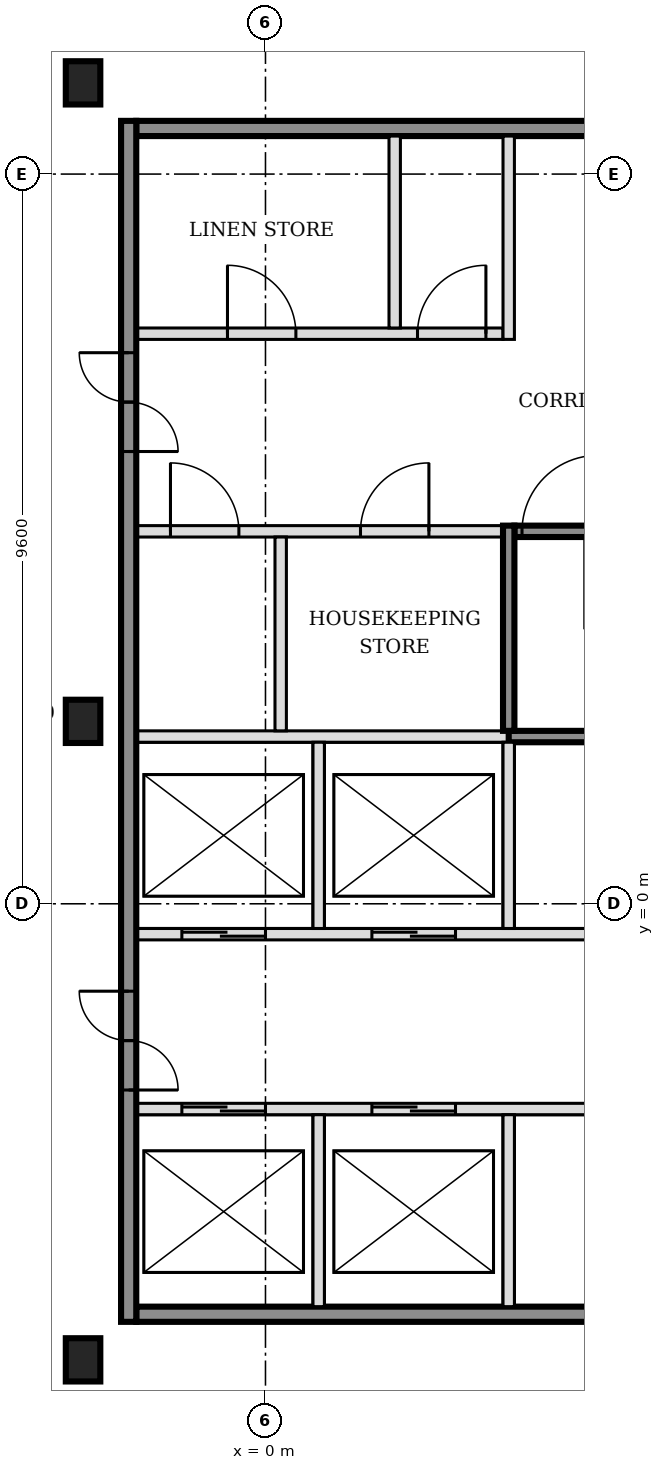
"""IFC4 building model, lengths in metres.
Left out: names, types, materials, properties, quantities, classifications, styles, units other than length and angle.
Written with IfcOpenShell. Run it as: python <this file> out.ifc"""

import sys

from ifc_helpers import new_model, si_unit, direction, frame, frame_2d, origin, origin_2d, place, context, subcontext, project, spatial, rectangle, i_section, extrude, element, fill, save


model = new_model("IFC4")
c1 = context("Model", 3, precision=1e-05, world=origin(), true_north=direction((0.0, 1.0)))
c2 = subcontext(c1, "Body", "Model", "MODEL_VIEW")
j1 = project(units=[si_unit("LENGTHUNIT", "METRE"), si_unit("PLANEANGLEUNIT", "RADIAN")], contexts=[c1])
p1 = place(None, origin())
s1 = spatial("IfcSite", under=j1, at=p1, CompositionType="ELEMENT")
p2 = place(p1, origin())
s2 = spatial("IfcBuilding", under=s1, at=p2, CompositionType="ELEMENT")
p3 = place(p2, frame((0.0, 0.0, 54.6)))
s3 = spatial("IfcBuildingStorey", under=s2, at=p3, CompositionType="ELEMENT", Elevation=54.6)
for number, where, z_axis, x_axis in (
    (1, (-2.4, -6.0, -0.15), (0.0, 0.0, 1.0), (1.0, 0.0, 0.0)),
    (2, (-2.4, 2.4, -0.15), (0.0, 0.0, 1.0), (1.0, 0.0, 0.0)),
    (3, (-2.4, 10.8, -0.15), (0.0, 0.0, 1.0), (1.0, 0.0, 0.0)),
):
    element("IfcColumn", number, at=place(p3, frame(where, z_axis=z_axis, x_axis=x_axis)), inside=s3, PredefinedType="COLUMN", context=c2, shape_type="SweptSolid", body=[
        extrude(i_section(OverallWidth=0.454, OverallDepth=0.569, WebThickness=0.078, FlangeThickness=0.125, FilletRadius=0.015, at=origin_2d()), origin(), (0.0, 0.0, 1.0), 3.6),
    ])
p4 = place(p3, frame((-1.7, -5.4, 0.0), z_axis=(0.0, 0.0, 1.0), x_axis=(1.0, 0.0, 0.0)))
e4 = element("IfcWall", 4, at=p4, inside=s3, PredefinedType="SOLIDWALL", context=c2, shape_type="SweptSolid", body=[
    extrude(rectangle(XDim=7.9, YDim=0.2, at=frame_2d((3.95, 0.0))), origin(), (0.0, 0.0, 1.0), 3.45),
])
p5 = place(p3, frame((-1.7, -2.7, 0.0), z_axis=(0.0, 0.0, 1.0), x_axis=(1.0, 0.0, 0.0)))
e5 = element("IfcWall", 5, at=p5, inside=s3, PredefinedType="SOLIDWALL", context=c2, shape_type="SweptSolid", body=[
    extrude(rectangle(XDim=7.9, YDim=0.15, at=frame_2d((3.95, 0.0))), origin(), (0.0, 0.0, 1.0), 3.45),
])
p6 = place(p5, frame((0.6, 0.0, 0.0)))
e6 = element("IfcOpeningElement", 6, at=p6, cuts=e5, PredefinedType="OPENING", context=c2, shape_type="SweptSolid", body=[
    extrude(rectangle(XDim=1.1, YDim=2.1, at=frame_2d((0.55, 1.05))), frame((0.0, 0.085, 0.0), z_axis=(0.0, -1.0, 0.0), x_axis=(1.0, 0.0, 0.0)), (0.0, 0.0, 1.0), 0.17),
])
p7 = place(p5, frame((3.1, 0.0, 0.0)))
e7 = element("IfcOpeningElement", 7, at=p7, cuts=e5, PredefinedType="OPENING", context=c2, shape_type="SweptSolid", body=[
    extrude(rectangle(XDim=1.1, YDim=2.1, at=frame_2d((0.55, 1.05))), frame((0.0, 0.085, 0.0), z_axis=(0.0, -1.0, 0.0), x_axis=(1.0, 0.0, 0.0)), (0.0, 0.0, 1.0), 0.17),
])
p8 = place(p3, frame((-1.7, -0.4, 0.0), z_axis=(0.0, 0.0, 1.0), x_axis=(1.0, 0.0, 0.0)))
e8 = element("IfcWall", 8, at=p8, inside=s3, PredefinedType="SOLIDWALL", context=c2, shape_type="SweptSolid", body=[
    extrude(rectangle(XDim=15.925, YDim=0.15, at=frame_2d((7.962, 0.0))), origin(), (0.0, 0.0, 1.0), 3.45),
])
p9 = place(p8, frame((0.6, 0.0, 0.0)))
e9 = element("IfcOpeningElement", 9, at=p9, cuts=e8, PredefinedType="OPENING", context=c2, shape_type="SweptSolid", body=[
    extrude(rectangle(XDim=1.1, YDim=2.1, at=frame_2d((0.55, 1.05))), frame((0.0, 0.085, 0.0), z_axis=(0.0, -1.0, 0.0), x_axis=(1.0, 0.0, 0.0)), (0.0, 0.0, 1.0), 0.17),
])
p10 = place(p8, frame((3.1, 0.0, 0.0)))
e10 = element("IfcOpeningElement", 10, at=p10, cuts=e8, PredefinedType="OPENING", context=c2, shape_type="SweptSolid", body=[
    extrude(rectangle(XDim=1.1, YDim=2.1, at=frame_2d((0.55, 1.05))), frame((0.0, 0.085, 0.0), z_axis=(0.0, -1.0, 0.0), x_axis=(1.0, 0.0, 0.0)), (0.0, 0.0, 1.0), 0.17),
])
p11 = place(p8, frame((11.575, 0.0, 0.0)))
e11 = element("IfcOpeningElement", 11, at=p11, cuts=e8, PredefinedType="OPENING", context=c2, shape_type="SweptSolid", body=[
    extrude(rectangle(XDim=1.2, YDim=2.1, at=frame_2d((0.6, 1.05))), frame((0.0, 0.085, 0.0), z_axis=(0.0, -1.0, 0.0), x_axis=(1.0, 0.0, 0.0)), (0.0, 0.0, 1.0), 0.17),
])
p12 = place(p8, frame((14.125, 0.0, 0.0)))
e12 = element("IfcOpeningElement", 12, at=p12, cuts=e8, PredefinedType="OPENING", context=c2, shape_type="SweptSolid", body=[
    extrude(rectangle(XDim=1.2, YDim=2.1, at=frame_2d((0.6, 1.05))), frame((0.0, 0.085, 0.0), z_axis=(0.0, -1.0, 0.0), x_axis=(1.0, 0.0, 0.0)), (0.0, 0.0, 1.0), 0.17),
])
p13 = place(p3, frame((-1.7, 2.2, 0.0), z_axis=(0.0, 0.0, 1.0), x_axis=(1.0, 0.0, 0.0)))
e13 = element("IfcWall", 13, at=p13, inside=s3, PredefinedType="SOLIDWALL", context=c2, shape_type="SweptSolid", body=[
    extrude(rectangle(XDim=4.9, YDim=0.15, at=frame_2d((2.45, 0.0))), origin(), (0.0, 0.0, 1.0), 3.45),
])
p14 = place(p3, frame((3.2, 2.2, 0.0), z_axis=(0.0, 0.0, 1.0), x_axis=(1.0, 0.0, 0.0)))
e14 = element("IfcWall", 14, at=p14, inside=s3, PredefinedType="SOLIDWALL", context=c2, shape_type="SweptSolid", body=[
    extrude(rectangle(XDim=6.5, YDim=0.15, at=frame_2d((3.25, 0.0))), origin(), (0.0, 0.0, 1.0), 3.45),
])
p15 = place(p3, frame((-1.7, 4.9, 0.0), z_axis=(0.0, 0.0, 1.0), x_axis=(1.0, 0.0, 0.0)))
e15 = element("IfcWall", 15, at=p15, inside=s3, PredefinedType="PARTITIONING", context=c2, shape_type="SweptSolid", body=[
    extrude(rectangle(XDim=4.825, YDim=0.15, at=frame_2d((2.413, 0.0))), origin(), (0.0, 0.0, 1.0), 3.45),
])
p16 = place(p15, frame((0.45, 0.0, 0.0)))
e16 = element("IfcOpeningElement", 16, at=p16, cuts=e15, PredefinedType="OPENING", context=c2, shape_type="SweptSolid", body=[
    extrude(rectangle(XDim=0.9, YDim=2.1, at=frame_2d((0.45, 1.05))), frame((0.0, 0.085, 0.0), z_axis=(0.0, -1.0, 0.0), x_axis=(1.0, 0.0, 0.0)), (0.0, 0.0, 1.0), 0.17),
])
p17 = place(p15, frame((2.95, 0.0, 0.0)))
e17 = element("IfcOpeningElement", 17, at=p17, cuts=e15, PredefinedType="OPENING", context=c2, shape_type="SweptSolid", body=[
    extrude(rectangle(XDim=0.9, YDim=2.1, at=frame_2d((0.45, 1.05))), frame((0.0, 0.085, 0.0), z_axis=(0.0, -1.0, 0.0), x_axis=(1.0, 0.0, 0.0)), (0.0, 0.0, 1.0), 0.17),
])
p18 = place(p3, frame((3.275, 4.9, 0.0), z_axis=(0.0, 0.0, 1.0), x_axis=(1.0, 0.0, 0.0)))
e18 = element("IfcWall", 18, at=p18, inside=s3, PredefinedType="SOLIDWALL", context=c2, shape_type="SweptSolid", body=[
    extrude(rectangle(XDim=6.425, YDim=0.15, at=frame_2d((3.212, 0.0))), origin(), (0.0, 0.0, 1.0), 3.45),
])
p19 = place(p18, frame((0.1, 0.0, 0.0)))
e19 = element("IfcOpeningElement", 19, at=p19, cuts=e18, PredefinedType="OPENING", context=c2, shape_type="SweptSolid", body=[
    extrude(rectangle(XDim=1.0, YDim=2.1, at=frame_2d((0.5, 1.05))), frame((0.0, 0.085, 0.0), z_axis=(0.0, -1.0, 0.0), x_axis=(1.0, 0.0, 0.0)), (0.0, 0.0, 1.0), 0.17),
])
p20 = place(p3, frame((-1.7, 7.5, 0.0), z_axis=(0.0, 0.0, 1.0), x_axis=(1.0, 0.0, 0.0)))
e20 = element("IfcWall", 20, at=p20, inside=s3, PredefinedType="PARTITIONING", context=c2, shape_type="SweptSolid", body=[
    extrude(rectangle(XDim=4.825, YDim=0.15, at=frame_2d((2.413, 0.0))), origin(), (0.0, 0.0, 1.0), 3.45),
])
p21 = place(p20, frame((1.2, 0.0, 0.0)))
e21 = element("IfcOpeningElement", 21, at=p21, cuts=e20, PredefinedType="OPENING", context=c2, shape_type="SweptSolid", body=[
    extrude(rectangle(XDim=0.9, YDim=2.1, at=frame_2d((0.45, 1.05))), frame((0.0, 0.085, 0.0), z_axis=(0.0, -1.0, 0.0), x_axis=(1.0, 0.0, 0.0)), (0.0, 0.0, 1.0), 0.17),
])
p22 = place(p20, frame((3.7, 0.0, 0.0)))
e22 = element("IfcOpeningElement", 22, at=p22, cuts=e20, PredefinedType="OPENING", context=c2, shape_type="SweptSolid", body=[
    extrude(rectangle(XDim=0.9, YDim=2.1, at=frame_2d((0.45, 1.05))), frame((0.0, 0.085, 0.0), z_axis=(0.0, -1.0, 0.0), x_axis=(1.0, 0.0, 0.0)), (0.0, 0.0, 1.0), 0.17),
])
p23 = place(p3, frame((-1.7, 10.2, 0.0), z_axis=(0.0, 0.0, 1.0), x_axis=(1.0, 0.0, 0.0)))
e23 = element("IfcWall", 23, at=p23, inside=s3, PredefinedType="SOLIDWALL", context=c2, shape_type="SweptSolid", body=[
    extrude(rectangle(XDim=7.9, YDim=0.2, at=frame_2d((3.95, 0.0))), origin(), (0.0, 0.0, 1.0), 3.45),
])
p24 = place(p3, frame((-1.8, -5.5, 0.0), z_axis=(0.0, 0.0, 1.0), x_axis=(0.0, 1.0, 0.0)))
e24 = element("IfcWall", 24, at=p24, inside=s3, PredefinedType="SOLIDWALL", context=c2, shape_type="SweptSolid", body=[
    extrude(rectangle(XDim=15.8, YDim=0.2, at=frame_2d((7.9, 0.0))), origin(), (0.0, 0.0, 1.0), 3.45),
])
p25 = place(p24, frame((3.05, 0.0, 0.0)))
e25 = element("IfcOpeningElement", 25, at=p25, cuts=e24, PredefinedType="OPENING", context=c2, shape_type="SweptSolid", body=[
    extrude(rectangle(XDim=1.3, YDim=2.1, at=frame_2d((0.65, 1.05))), frame((0.0, 0.11, 0.0), z_axis=(0.0, -1.0, 0.0), x_axis=(1.0, 0.0, 0.0)), (0.0, 0.0, 1.0), 0.22),
])
p26 = place(p24, frame((11.45, 0.0, 0.0)))
e26 = element("IfcOpeningElement", 26, at=p26, cuts=e24, PredefinedType="OPENING", context=c2, shape_type="SweptSolid", body=[
    extrude(rectangle(XDim=1.3, YDim=2.1, at=frame_2d((0.65, 1.05))), frame((0.0, 0.11, 0.0), z_axis=(0.0, -1.0, 0.0), x_axis=(1.0, 0.0, 0.0)), (0.0, 0.0, 1.0), 0.22),
])
p27 = place(p3, frame((0.2, 2.275, 0.0), z_axis=(0.0, 0.0, 1.0), x_axis=(0.0, 1.0, 0.0)))
e27 = element("IfcWall", 27, at=p27, inside=s3, PredefinedType="PARTITIONING", context=c2, shape_type="SweptSolid", body=[
    extrude(rectangle(XDim=2.55, YDim=0.15, at=frame_2d((1.275, 0.0))), origin(), (0.0, 0.0, 1.0), 3.45),
])
p28 = place(p3, frame((0.7, -5.3, 0.0), z_axis=(0.0, 0.0, 1.0), x_axis=(0.0, 1.0, 0.0)))
e28 = element("IfcWall", 28, at=p28, inside=s3, PredefinedType="SOLIDWALL", context=c2, shape_type="SweptSolid", body=[
    extrude(rectangle(XDim=2.525, YDim=0.15, at=frame_2d((1.263, 0.0))), origin(), (0.0, 0.0, 1.0), 3.45),
])
p29 = place(p3, frame((0.7, -0.325, 0.0), z_axis=(0.0, 0.0, 1.0), x_axis=(0.0, 1.0, 0.0)))
e29 = element("IfcWall", 29, at=p29, inside=s3, PredefinedType="SOLIDWALL", context=c2, shape_type="SweptSolid", body=[
    extrude(rectangle(XDim=2.45, YDim=0.15, at=frame_2d((1.225, 0.0))), origin(), (0.0, 0.0, 1.0), 3.45),
])
p30 = place(p3, frame((1.7, 7.575, 0.0), z_axis=(0.0, 0.0, 1.0), x_axis=(0.0, 1.0, 0.0)))
e30 = element("IfcWall", 30, at=p30, inside=s3, PredefinedType="PARTITIONING", context=c2, shape_type="SweptSolid", body=[
    extrude(rectangle(XDim=2.525, YDim=0.15, at=frame_2d((1.263, 0.0))), origin(), (0.0, 0.0, 1.0), 3.45),
])
p31 = place(p3, frame((3.2, -5.3, 0.0), z_axis=(0.0, 0.0, 1.0), x_axis=(0.0, 1.0, 0.0)))
e31 = element("IfcWall", 31, at=p31, inside=s3, PredefinedType="SOLIDWALL", context=c2, shape_type="SweptSolid", body=[
    extrude(rectangle(XDim=2.525, YDim=0.15, at=frame_2d((1.263, 0.0))), origin(), (0.0, 0.0, 1.0), 3.45),
])
p32 = place(p3, frame((3.2, -0.325, 0.0), z_axis=(0.0, 0.0, 1.0), x_axis=(0.0, 1.0, 0.0)))
e32 = element("IfcWall", 32, at=p32, inside=s3, PredefinedType="SOLIDWALL", context=c2, shape_type="SweptSolid", body=[
    extrude(rectangle(XDim=2.45, YDim=0.15, at=frame_2d((1.225, 0.0))), origin(), (0.0, 0.0, 1.0), 3.45),
])
p33 = place(p3, frame((3.2, 2.275, 0.0), z_axis=(0.0, 0.0, 1.0), x_axis=(0.0, 1.0, 0.0)))
e33 = element("IfcWall", 33, at=p33, inside=s3, PredefinedType="SOLIDWALL", context=c2, shape_type="SweptSolid", body=[
    extrude(rectangle(XDim=2.7, YDim=0.15, at=frame_2d((1.35, 0.0))), origin(), (0.0, 0.0, 1.0), 3.45),
])
p34 = place(p3, frame((3.2, 7.425, 0.0), z_axis=(0.0, 0.0, 1.0), x_axis=(0.0, 1.0, 0.0)))
e34 = element("IfcWall", 34, at=p34, inside=s3, PredefinedType="PARTITIONING", context=c2, shape_type="SweptSolid", body=[
    extrude(rectangle(XDim=2.675, YDim=0.15, at=frame_2d((1.337, 0.0))), origin(), (0.0, 0.0, 1.0), 3.45),
])
p35 = place(p6, origin())
e35 = element("IfcDoor", 35, at=p35, inside=s3, OperationType="DOUBLE_DOOR_SLIDING", PredefinedType="DOOR", context=c2, shape_type="SweptSolid", body=[
    extrude(rectangle(XDim=1.1, YDim=2.1, at=frame_2d((0.55, 1.05))), frame((0.0, 0.025, 0.0), z_axis=(0.0, -1.0, 0.0), x_axis=(1.0, 0.0, 0.0)), (0.0, 0.0, 1.0), 0.05),
])
fill(e6, e35)
p36 = place(p7, origin())
e36 = element("IfcDoor", 36, at=p36, inside=s3, OperationType="DOUBLE_DOOR_SLIDING", PredefinedType="DOOR", context=c2, shape_type="SweptSolid", body=[
    extrude(rectangle(XDim=1.1, YDim=2.1, at=frame_2d((0.55, 1.05))), frame((0.0, 0.025, 0.0), z_axis=(0.0, -1.0, 0.0), x_axis=(1.0, 0.0, 0.0)), (0.0, 0.0, 1.0), 0.05),
])
fill(e7, e36)
p37 = place(p9, origin())
e37 = element("IfcDoor", 37, at=p37, inside=s3, OperationType="DOUBLE_DOOR_SLIDING", PredefinedType="DOOR", context=c2, shape_type="SweptSolid", body=[
    extrude(rectangle(XDim=1.1, YDim=2.1, at=frame_2d((0.55, 1.05))), frame((0.0, 0.025, 0.0), z_axis=(0.0, -1.0, 0.0), x_axis=(1.0, 0.0, 0.0)), (0.0, 0.0, 1.0), 0.05),
])
fill(e9, e37)
p38 = place(p10, origin())
e38 = element("IfcDoor", 38, at=p38, inside=s3, OperationType="DOUBLE_DOOR_SLIDING", PredefinedType="DOOR", context=c2, shape_type="SweptSolid", body=[
    extrude(rectangle(XDim=1.1, YDim=2.1, at=frame_2d((0.55, 1.05))), frame((0.0, 0.025, 0.0), z_axis=(0.0, -1.0, 0.0), x_axis=(1.0, 0.0, 0.0)), (0.0, 0.0, 1.0), 0.05),
])
fill(e10, e38)
p39 = place(p19, origin())
e39 = element("IfcDoor", 39, at=p39, inside=s3, OperationType="SINGLE_SWING_RIGHT", PredefinedType="DOOR", context=c2, shape_type="SweptSolid", body=[
    extrude(rectangle(XDim=1.0, YDim=2.1, at=frame_2d((0.5, 1.05))), frame((0.0, 0.025, 0.0), z_axis=(0.0, -1.0, 0.0), x_axis=(1.0, 0.0, 0.0)), (0.0, 0.0, 1.0), 0.05),
])
fill(e19, e39)
p40 = place(p25, origin())
e40 = element("IfcDoor", 40, at=p40, inside=s3, OperationType="DOUBLE_DOOR_SINGLE_SWING", PredefinedType="DOOR", context=c2, shape_type="SweptSolid", body=[
    extrude(rectangle(XDim=1.3, YDim=2.1, at=frame_2d((0.65, 1.05))), frame((0.0, 0.025, 0.0), z_axis=(0.0, -1.0, 0.0), x_axis=(1.0, 0.0, 0.0)), (0.0, 0.0, 1.0), 0.05),
])
fill(e25, e40)
p41 = place(p26, origin())
e41 = element("IfcDoor", 41, at=p41, inside=s3, OperationType="DOUBLE_DOOR_SINGLE_SWING", PredefinedType="DOOR", context=c2, shape_type="SweptSolid", body=[
    extrude(rectangle(XDim=1.3, YDim=2.1, at=frame_2d((0.65, 1.05))), frame((0.0, 0.025, 0.0), z_axis=(0.0, -1.0, 0.0), x_axis=(1.0, 0.0, 0.0)), (0.0, 0.0, 1.0), 0.05),
])
fill(e26, e41)
p42 = place(p16, origin())
e42 = element("IfcDoor", 42, at=p42, inside=s3, OperationType="SINGLE_SWING_LEFT", PredefinedType="DOOR", context=c2, shape_type="SweptSolid", body=[
    extrude(rectangle(XDim=0.9, YDim=2.1, at=frame_2d((0.45, 1.05))), frame((0.0, 0.025, 0.0), z_axis=(0.0, -1.0, 0.0), x_axis=(1.0, 0.0, 0.0)), (0.0, 0.0, 1.0), 0.05),
])
fill(e16, e42)
p43 = place(p17, origin())
e43 = element("IfcDoor", 43, at=p43, inside=s3, OperationType="SINGLE_SWING_RIGHT", PredefinedType="DOOR", context=c2, shape_type="SweptSolid", body=[
    extrude(rectangle(XDim=0.9, YDim=2.1, at=frame_2d((0.45, 1.05))), frame((0.0, 0.025, 0.0), z_axis=(0.0, -1.0, 0.0), x_axis=(1.0, 0.0, 0.0)), (0.0, 0.0, 1.0), 0.05),
])
fill(e17, e43)
p44 = place(p21, origin())
e44 = element("IfcDoor", 44, at=p44, inside=s3, OperationType="SINGLE_SWING_LEFT", PredefinedType="DOOR", context=c2, shape_type="SweptSolid", body=[
    extrude(rectangle(XDim=0.9, YDim=2.1, at=frame_2d((0.45, 1.05))), frame((0.0, 0.025, 0.0), z_axis=(0.0, -1.0, 0.0), x_axis=(1.0, 0.0, 0.0)), (0.0, 0.0, 1.0), 0.05),
])
fill(e21, e44)
p45 = place(p22, origin())
e45 = element("IfcDoor", 45, at=p45, inside=s3, OperationType="SINGLE_SWING_RIGHT", PredefinedType="DOOR", context=c2, shape_type="SweptSolid", body=[
    extrude(rectangle(XDim=0.9, YDim=2.1, at=frame_2d((0.45, 1.05))), frame((0.0, 0.025, 0.0), z_axis=(0.0, -1.0, 0.0), x_axis=(1.0, 0.0, 0.0)), (0.0, 0.0, 1.0), 0.05),
])
fill(e22, e45)
save(model, sys.argv[1])
